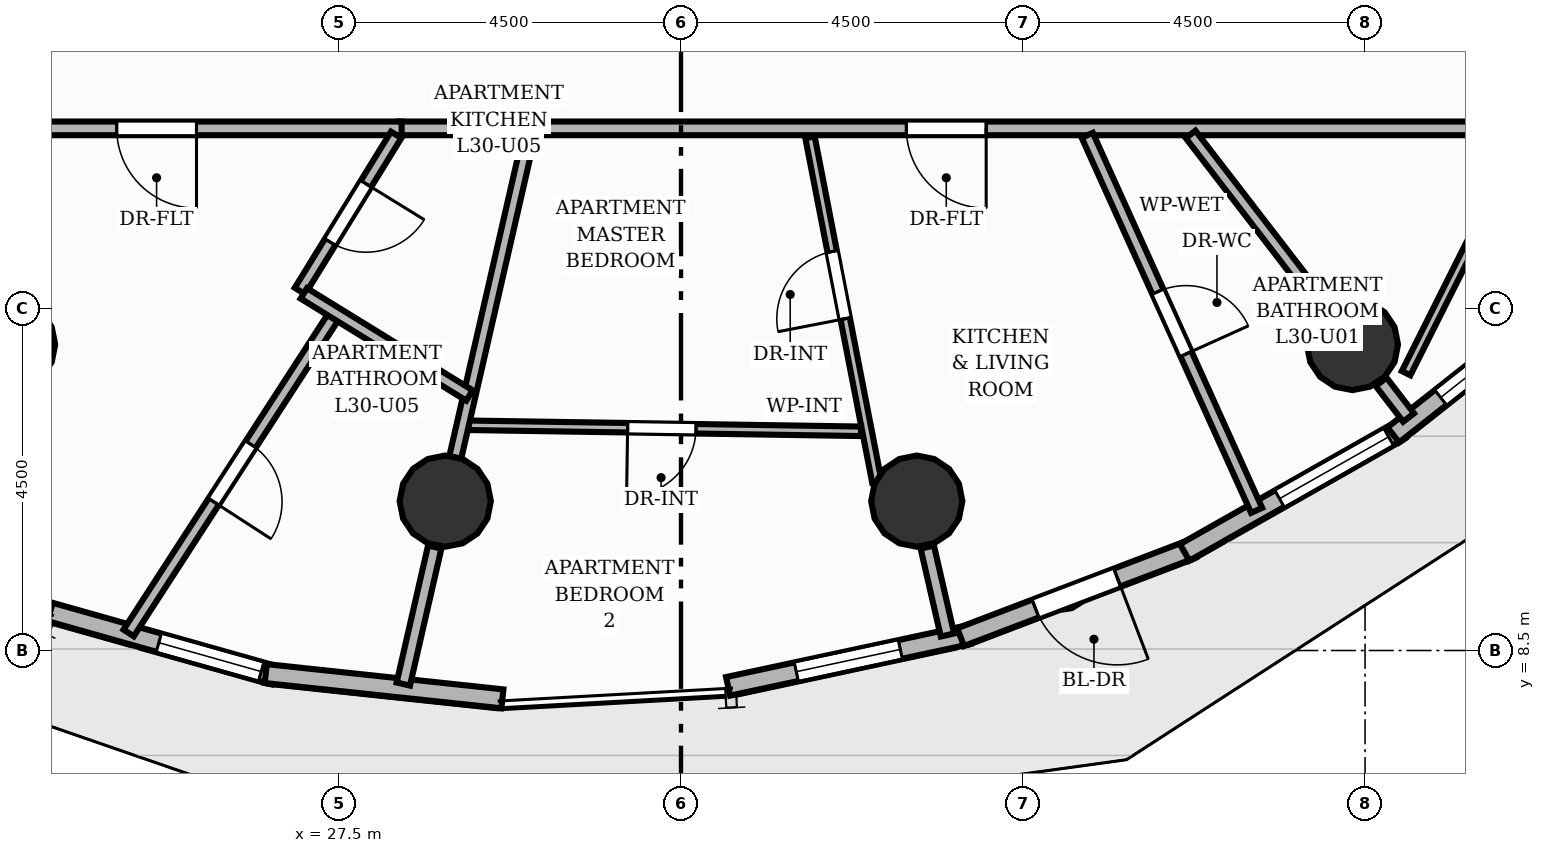
"""IFC4 building model, lengths in metres.
Left out: names, types, materials, properties, quantities, classifications, styles, units other than length and angle.
Written with IfcOpenShell. Run it as: python <this file> out.ifc"""

import sys

from ifc_helpers import new_model, si_unit, direction, frame, frame_2d, origin, origin_2d, place, context, subcontext, project, spatial, rectangle, circle, extrude, element, fill, save


model = new_model("IFC4")
c1 = context("Model", 3, precision=1e-05, world=origin(), true_north=direction((0.0, 1.0)))
c2 = subcontext(c1, "Body", "Model", "MODEL_VIEW")
j1 = project(units=[si_unit("LENGTHUNIT", "METRE"), si_unit("PLANEANGLEUNIT", "RADIAN")], contexts=[c1])
p1 = place(None, origin())
s1 = spatial("IfcSite", under=j1, at=p1, CompositionType="ELEMENT")
p2 = place(p1, origin())
s2 = spatial("IfcBuilding", under=s1, at=p2, CompositionType="ELEMENT")
p3 = place(p2, frame((0.0, 0.0, 102.88)))
s3 = spatial("IfcBuildingStorey", under=s2, at=p3, CompositionType="ELEMENT", Elevation=102.88)
for number, where, z_axis, x_axis in (
    (1, (23.167, 12.526, 0.0), (0.0, 0.0, 1.0), (1.0, 0.0, 0.0)),
    (2, (28.898, 10.465, 0.0), (0.0, 0.0, 1.0), (1.0, 0.0, 0.0)),
    (3, (35.102, 10.465, 0.0), (0.0, 0.0, 1.0), (1.0, 0.0, 0.0)),
    (4, (40.833, 12.526, 0.0), (0.0, 0.0, 1.0), (1.0, 0.0, 0.0)),
):
    element("IfcColumn", number, at=place(p3, frame(where, z_axis=z_axis, x_axis=x_axis)), inside=s3, PredefinedType="COLUMN", context=c2, shape_type="SweptSolid", body=[
        extrude(circle(Radius=0.6, at=origin_2d()), origin(), (0.0, 0.0, 1.0), 3.2),
    ])
p4 = place(p3, frame((26.646, 8.175, 0.0), z_axis=(0.0, 0.0, 1.0), x_axis=(-0.962391946781, 0.271664758059, 0.0)))
e5 = element("IfcWall", 5, at=p4, inside=s3, PredefinedType="SOLIDWALL", context=c2, shape_type="SweptSolid", body=[
    extrude(rectangle(XDim=3.061, YDim=0.25, at=frame_2d((1.531, 0.0))), origin(), (0.0, 0.0, 1.0), 2.96),
])
p5 = place(p4, frame((0.175, 0.0, 0.85)))
e6 = element("IfcOpeningElement", 6, at=p5, cuts=e5, PredefinedType="OPENING", context=c2, shape_type="SweptSolid", body=[
    extrude(rectangle(XDim=1.4, YDim=1.55, at=frame_2d((0.7, 0.775))), frame((0.0, 0.135, 0.0), z_axis=(0.0, -1.0, 0.0), x_axis=(1.0, 0.0, 0.0)), (0.0, 0.0, 1.0), 0.27),
])
p6 = place(p3, frame((29.65, 7.864, 0.0), z_axis=(0.0, 0.0, 1.0), x_axis=(-0.994353607356, 0.106117404502, 0.0)))
e7 = element("IfcWall", 7, at=p6, inside=s3, PredefinedType="SOLIDWALL", context=c2, shape_type="SweptSolid", body=[
    extrude(rectangle(XDim=3.131, YDim=0.25, at=frame_2d((1.565, 0.0))), origin(), (0.0, 0.0, 1.0), 2.96),
])
p7 = place(p3, frame((35.783, 8.707, 0.0), z_axis=(0.0, 0.0, 1.0), x_axis=(-0.977758229837, -0.209735175845, 0.0)))
e8 = element("IfcWall", 8, at=p7, inside=s3, PredefinedType="SOLIDWALL", context=c2, shape_type="SweptSolid", body=[
    extrude(rectangle(XDim=3.236, YDim=0.25, at=frame_2d((1.618, 0.0))), origin(), (0.0, 0.0, 1.0), 2.96),
])
p8 = place(p7, frame((0.918, 0.0, 0.85)))
e9 = element("IfcOpeningElement", 9, at=p8, cuts=e8, PredefinedType="OPENING", context=c2, shape_type="SweptSolid", body=[
    extrude(rectangle(XDim=1.4, YDim=1.55, at=frame_2d((0.7, 0.775))), frame((0.0, 0.135, 0.0), z_axis=(0.0, -1.0, 0.0), x_axis=(1.0, 0.0, 0.0)), (0.0, 0.0, 1.0), 0.27),
])
p9 = place(p3, frame((38.725, 9.836, 0.0), z_axis=(0.0, 0.0, 1.0), x_axis=(-0.934481801939, -0.3560109013, 0.0)))
e10 = element("IfcWall", 10, at=p9, inside=s3, PredefinedType="SOLIDWALL", context=c2, shape_type="SweptSolid", body=[
    extrude(rectangle(XDim=3.26, YDim=0.25, at=frame_2d((1.63, 0.0))), origin(), (0.0, 0.0, 1.0), 2.96),
])
p10 = place(p9, frame((1.055, 0.0, 0.0)))
e11 = element("IfcOpeningElement", 11, at=p10, cuts=e10, PredefinedType="OPENING", context=c2, shape_type="SweptSolid", body=[
    extrude(rectangle(XDim=1.15, YDim=2.2, at=frame_2d((0.575, 1.1))), frame((0.0, 0.135, 0.0), z_axis=(0.0, -1.0, 0.0), x_axis=(1.0, 0.0, 0.0)), (0.0, 0.0, 1.0), 0.27),
])
p11 = place(p3, frame((41.462, 11.397, 0.0), z_axis=(0.0, 0.0, 1.0), x_axis=(-0.869984700924, -0.493078715986, 0.0)))
e12 = element("IfcWall", 12, at=p11, inside=s3, PredefinedType="SOLIDWALL", context=c2, shape_type="SweptSolid", body=[
    extrude(rectangle(XDim=3.26, YDim=0.25, at=frame_2d((1.63, 0.0))), origin(), (0.0, 0.0, 1.0), 2.96),
])
p12 = place(p11, frame((0.175, 0.0, 0.85)))
e13 = element("IfcOpeningElement", 13, at=p12, cuts=e12, PredefinedType="OPENING", context=c2, shape_type="SweptSolid", body=[
    extrude(rectangle(XDim=1.65, YDim=1.55, at=frame_2d((0.825, 0.775))), frame((0.0, 0.135, 0.0), z_axis=(0.0, -1.0, 0.0), x_axis=(1.0, 0.0, 0.0)), (0.0, 0.0, 1.0), 0.27),
])
p13 = place(p3, frame((43.912, 13.342, 0.0), z_axis=(0.0, 0.0, 1.0), x_axis=(-0.784871179145, -0.619658964389, 0.0)))
e14 = element("IfcWall", 14, at=p13, inside=s3, PredefinedType="SOLIDWALL", context=c2, shape_type="SweptSolid", body=[
    extrude(rectangle(XDim=3.236, YDim=0.25, at=frame_2d((1.618, 0.0))), origin(), (0.0, 0.0, 1.0), 2.96),
])
p14 = place(p13, frame((0.793, 0.0, 0.85)))
e15 = element("IfcOpeningElement", 15, at=p14, cuts=e14, PredefinedType="OPENING", context=c2, shape_type="SweptSolid", body=[
    extrude(rectangle(XDim=1.65, YDim=1.55, at=frame_2d((0.825, 0.775))), frame((0.0, 0.135, 0.0), z_axis=(0.0, -1.0, 0.0), x_axis=(1.0, 0.0, 0.0)), (0.0, 0.0, 1.0), 0.27),
])
p15 = place(p3, frame((28.76, 9.861, 0.0), z_axis=(0.0, 0.0, 1.0), x_axis=(-0.2234127464, -0.974723932581, 0.0)))
e16 = element("IfcWall", 16, at=p15, inside=s3, PredefinedType="PARTITIONING", context=c2, shape_type="SweptSolid", body=[
    extrude(rectangle(XDim=1.849, YDim=0.18, at=frame_2d((0.924, 0.0))), origin(), (0.0, 0.0, 1.0), 2.261),
])
p16 = place(p3, frame((35.24, 9.861, 0.0), z_axis=(0.0, 0.0, 1.0), x_axis=(0.223327310752, -0.974743511018, 0.0)))
e17 = element("IfcWall", 17, at=p16, inside=s3, PredefinedType="PARTITIONING", context=c2, shape_type="SweptSolid", body=[
    extrude(rectangle(XDim=1.187, YDim=0.18, at=frame_2d((0.594, 0.0))), origin(), (0.0, 0.0, 1.0), 2.261),
])
p17 = place(p3, frame((41.212, 12.034, 0.0), z_axis=(0.0, 0.0, 1.0), x_axis=(0.609790512648, -0.792562635181, 0.0)))
e18 = element("IfcWall", 18, at=p17, inside=s3, PredefinedType="PARTITIONING", context=c2, shape_type="SweptSolid", body=[
    extrude(rectangle(XDim=0.592, YDim=0.18, at=frame_2d((0.296, 0.0))), origin(), (0.0, 0.0, 1.0), 2.261),
])
p18 = place(p3, frame((42.63, 15.37, 0.0), z_axis=(0.0, 0.0, 1.0), x_axis=(-1.0, 0.0, 0.0)))
e19 = element("IfcWall", 19, at=p18, inside=s3, PredefinedType="PARTITIONING", context=c2, shape_type="SweptSolid", body=[
    extrude(rectangle(XDim=14.346, YDim=0.18, at=frame_2d((7.173, 0.0))), origin(), (0.0, 0.0, 1.0), 2.955),
])
p19 = place(p18, frame((6.615, 0.0, 0.0)))
e20 = element("IfcOpeningElement", 20, at=p19, cuts=e19, PredefinedType="OPENING", context=c2, shape_type="SweptSolid", body=[
    extrude(rectangle(XDim=1.05, YDim=2.15, at=frame_2d((0.525, 1.075))), frame((0.0, 0.1, 0.0), z_axis=(0.0, -1.0, 0.0), x_axis=(1.0, 0.0, 0.0)), (0.0, 0.0, 1.0), 0.2),
])
p20 = place(p3, frame((28.325, 15.37, 0.0), z_axis=(0.0, 0.0, 1.0), x_axis=(-1.0, 0.0, 0.0)))
e21 = element("IfcWall", 21, at=p20, inside=s3, PredefinedType="PARTITIONING", context=c2, shape_type="SweptSolid", body=[
    extrude(rectangle(XDim=6.955, YDim=0.18, at=frame_2d((3.478, 0.0))), origin(), (0.0, 0.0, 1.0), 2.955),
])
p21 = place(p20, frame((2.7, 0.0, 0.0)))
e22 = element("IfcOpeningElement", 22, at=p21, cuts=e21, PredefinedType="OPENING", context=c2, shape_type="SweptSolid", body=[
    extrude(rectangle(XDim=1.05, YDim=2.15, at=frame_2d((0.525, 1.075))), frame((0.0, 0.1, 0.0), z_axis=(0.0, -1.0, 0.0), x_axis=(1.0, 0.0, 0.0)), (0.0, 0.0, 1.0), 0.2),
])
p22 = place(p3, frame((37.345, 15.279, 0.0), z_axis=(0.0, 0.0, 1.0), x_axis=(0.411532357021, -0.911395149825, 0.0)))
e23 = element("IfcWall", 23, at=p22, inside=s3, PredefinedType="PLUMBINGWALL", context=c2, shape_type="SweptSolid", body=[
    extrude(rectangle(XDim=5.415, YDim=0.16, at=frame_2d((2.707, 0.0))), origin(), (0.0, 0.0, 1.0), 2.642),
])
p23 = place(p22, frame((2.257, 0.0, 0.0)))
e24 = element("IfcOpeningElement", 24, at=p23, cuts=e23, PredefinedType="OPENING", context=c2, shape_type="SweptSolid", body=[
    extrude(rectangle(XDim=0.9, YDim=2.1, at=frame_2d((0.45, 1.05))), frame((0.0, 0.09, 0.0), z_axis=(0.0, -1.0, 0.0), x_axis=(1.0, 0.0, 0.0)), (0.0, 0.0, 1.0), 0.18),
])
p24 = place(p3, frame((34.577, 10.719, 0.0), z_axis=(0.0, 0.0, 1.0), x_axis=(-0.19043944415, 0.981698944744, 0.0)))
e25 = element("IfcWall", 25, at=p24, inside=s3, PredefinedType="PARTITIONING", context=c2, shape_type="SweptSolid", body=[
    extrude(rectangle(XDim=4.618, YDim=0.125, at=frame_2d((2.309, 0.0))), origin(), (0.0, 0.0, 1.0), 2.955),
])
p25 = place(p24, frame((2.187, 0.0, 0.0)))
e26 = element("IfcOpeningElement", 26, at=p25, cuts=e25, PredefinedType="OPENING", context=c2, shape_type="SweptSolid", body=[
    extrude(rectangle(XDim=0.9, YDim=2.1, at=frame_2d((0.45, 1.05))), frame((0.0, 0.073, 0.0), z_axis=(0.0, -1.0, 0.0), x_axis=(1.0, 0.0, 0.0)), (0.0, 0.0, 1.0), 0.145),
])
p26 = place(p3, frame((38.705, 15.291, 0.0), z_axis=(0.0, 0.0, 1.0), x_axis=(0.610033601295, -0.792375545617, 0.0)))
e27 = element("IfcWall", 27, at=p26, inside=s3, PredefinedType="PLUMBINGWALL", context=c2, shape_type="SweptSolid", body=[
    extrude(rectangle(XDim=2.887, YDim=0.16, at=frame_2d((1.443, 0.0))), origin(), (0.0, 0.0, 1.0), 2.261),
])
p27 = place(p3, frame((34.368, 11.384, 0.0), z_axis=(0.0, 0.0, 1.0), x_axis=(-0.999882579861, 0.015324049414, 0.0)))
e28 = element("IfcWall", 28, at=p27, inside=s3, PredefinedType="PARTITIONING", context=c2, shape_type="SweptSolid", body=[
    extrude(rectangle(XDim=5.242, YDim=0.125, at=frame_2d((2.621, 0.0))), origin(), (0.0, 0.0, 1.0), 2.955),
])
p28 = place(p27, frame((2.171, 0.0, 0.0)))
e29 = element("IfcOpeningElement", 29, at=p28, cuts=e28, PredefinedType="OPENING", context=c2, shape_type="SweptSolid", body=[
    extrude(rectangle(XDim=0.9, YDim=2.1, at=frame_2d((0.45, 1.05))), frame((0.0, 0.073, 0.0), z_axis=(0.0, -1.0, 0.0), x_axis=(1.0, 0.0, 0.0)), (0.0, 0.0, 1.0), 0.145),
])
p29 = place(p3, frame((29.03, 11.041, 0.0), z_axis=(0.0, 0.0, 1.0), x_axis=(0.223478419757, 0.974708877513, 0.0)))
e30 = element("IfcWall", 30, at=p29, inside=s3, PredefinedType="PLUMBINGWALL", context=c2, shape_type="SweptSolid", body=[
    extrude(rectangle(XDim=4.442, YDim=0.16, at=frame_2d((2.221, 0.0))), origin(), (0.0, 0.0, 1.0), 2.261),
])
p30 = place(p3, frame((46.746, 22.528, 0.0), z_axis=(0.0, 0.0, 1.0), x_axis=(-0.448357094434, -0.893854527242, 0.0)))
e31 = element("IfcWall", 31, at=p30, inside=s3, PredefinedType="PARTITIONING", context=c2, shape_type="SweptSolid", body=[
    extrude(rectangle(XDim=11.611, YDim=0.125, at=frame_2d((5.805, 0.0))), origin(), (0.0, 0.0, 1.0), 2.404),
])
p31 = place(p30, frame((4.375, 0.0, 0.0)))
e32 = element("IfcOpeningElement", 32, at=p31, cuts=e31, PredefinedType="OPENING", context=c2, shape_type="SweptSolid", body=[
    extrude(rectangle(XDim=0.9, YDim=2.1, at=frame_2d((0.45, 1.05))), frame((0.0, 0.073, 0.0), z_axis=(0.0, -1.0, 0.0), x_axis=(1.0, 0.0, 0.0)), (0.0, 0.0, 1.0), 0.145),
])
p32 = place(p3, frame((27.458, 12.94, 0.0), z_axis=(0.0, 0.0, 1.0), x_axis=(-0.543424886613, -0.839457796801, 0.0)))
e33 = element("IfcWall", 33, at=p32, inside=s3, PredefinedType="PLUMBINGWALL", context=c2, shape_type="SweptSolid", body=[
    extrude(rectangle(XDim=5.014, YDim=0.16, at=frame_2d((2.507, 0.0))), origin(), (0.0, 0.0, 1.0), 2.642),
])
p33 = place(p32, frame((2.057, 0.0, 0.0)))
e34 = element("IfcOpeningElement", 34, at=p33, cuts=e33, PredefinedType="OPENING", context=c2, shape_type="SweptSolid", body=[
    extrude(rectangle(XDim=0.9, YDim=2.1, at=frame_2d((0.45, 1.05))), frame((0.0, 0.09, 0.0), z_axis=(0.0, -1.0, 0.0), x_axis=(1.0, 0.0, 0.0)), (0.0, 0.0, 1.0), 0.18),
])
p34 = place(p3, frame((28.253, 15.285, 0.0), z_axis=(0.0, 0.0, 1.0), x_axis=(-0.524605293124, -0.851345574033, 0.0)))
e35 = element("IfcWall", 35, at=p34, inside=s3, PredefinedType="PLUMBINGWALL", context=c2, shape_type="SweptSolid", body=[
    extrude(rectangle(XDim=2.414, YDim=0.16, at=frame_2d((1.207, 0.0))), origin(), (0.0, 0.0, 1.0), 2.955),
])
p35 = place(p34, frame((0.757, 0.0, 0.0)))
e36 = element("IfcOpeningElement", 36, at=p35, cuts=e35, PredefinedType="OPENING", context=c2, shape_type="SweptSolid", body=[
    extrude(rectangle(XDim=0.9, YDim=2.1, at=frame_2d((0.45, 1.05))), frame((0.0, 0.09, 0.0), z_axis=(0.0, -1.0, 0.0), x_axis=(1.0, 0.0, 0.0)), (0.0, 0.0, 1.0), 0.18),
])
p36 = place(p3, frame((27.038, 13.199, 0.0), z_axis=(0.0, 0.0, 1.0), x_axis=(0.851314293413, -0.524656052887, 0.0)))
e37 = element("IfcWall", 37, at=p36, inside=s3, PredefinedType="PLUMBINGWALL", context=c2, shape_type="SweptSolid", body=[
    extrude(rectangle(XDim=2.56, YDim=0.16, at=frame_2d((1.28, 0.0))), origin(), (0.0, 0.0, 1.0), 2.955),
])
p37 = place(p10, origin())
e38 = element("IfcDoor", 38, at=p37, inside=s3, OperationType="SINGLE_SWING_LEFT", PredefinedType="DOOR", context=c2, shape_type="SweptSolid", body=[
    extrude(rectangle(XDim=1.15, YDim=2.2, at=frame_2d((0.575, 1.1))), frame((0.0, 0.025, 0.0), z_axis=(0.0, -1.0, 0.0), x_axis=(1.0, 0.0, 0.0)), (0.0, 0.0, 1.0), 0.05),
])
fill(e11, e38)
p38 = place(p5, origin())
e39 = element("IfcWindow", 39, at=p38, inside=s3, PartitioningType="SINGLE_PANEL", PredefinedType="WINDOW", context=c2, shape_type="SweptSolid", body=[
    extrude(rectangle(XDim=1.4, YDim=1.55, at=frame_2d((0.7, 0.775))), frame((0.0, 0.03, 0.0), z_axis=(0.0, -1.0, 0.0), x_axis=(1.0, 0.0, 0.0)), (0.0, 0.0, 1.0), 0.06),
])
fill(e6, e39)
p39 = place(p8, origin())
e40 = element("IfcWindow", 40, at=p39, inside=s3, PartitioningType="SINGLE_PANEL", PredefinedType="WINDOW", context=c2, shape_type="SweptSolid", body=[
    extrude(rectangle(XDim=1.4, YDim=1.55, at=frame_2d((0.7, 0.775))), frame((0.0, 0.03, 0.0), z_axis=(0.0, -1.0, 0.0), x_axis=(1.0, 0.0, 0.0)), (0.0, 0.0, 1.0), 0.06),
])
fill(e9, e40)
p40 = place(p12, origin())
e41 = element("IfcWindow", 41, at=p40, inside=s3, PartitioningType="SINGLE_PANEL", PredefinedType="WINDOW", context=c2, shape_type="SweptSolid", body=[
    extrude(rectangle(XDim=1.65, YDim=1.55, at=frame_2d((0.825, 0.775))), frame((0.0, 0.03, 0.0), z_axis=(0.0, -1.0, 0.0), x_axis=(1.0, 0.0, 0.0)), (0.0, 0.0, 1.0), 0.06),
])
fill(e13, e41)
p41 = place(p14, origin())
e42 = element("IfcWindow", 42, at=p41, inside=s3, PartitioningType="SINGLE_PANEL", PredefinedType="WINDOW", context=c2, shape_type="SweptSolid", body=[
    extrude(rectangle(XDim=1.65, YDim=1.55, at=frame_2d((0.825, 0.775))), frame((0.0, 0.03, 0.0), z_axis=(0.0, -1.0, 0.0), x_axis=(1.0, 0.0, 0.0)), (0.0, 0.0, 1.0), 0.06),
])
fill(e15, e42)
p42 = place(p19, origin())
e43 = element("IfcDoor", 43, at=p42, inside=s3, OperationType="SINGLE_SWING_LEFT", PredefinedType="DOOR", context=c2, shape_type="SweptSolid", body=[
    extrude(rectangle(XDim=1.05, YDim=2.15, at=frame_2d((0.525, 1.075))), frame((0.0, 0.025, 0.0), z_axis=(0.0, -1.0, 0.0), x_axis=(1.0, 0.0, 0.0)), (0.0, 0.0, 1.0), 0.05),
])
fill(e20, e43)
p43 = place(p23, origin())
e44 = element("IfcDoor", 44, at=p43, inside=s3, OperationType="SINGLE_SWING_RIGHT", PredefinedType="DOOR", context=c2, shape_type="SweptSolid", body=[
    extrude(rectangle(XDim=0.9, YDim=2.1, at=frame_2d((0.45, 1.05))), frame((0.0, 0.025, 0.0), z_axis=(0.0, -1.0, 0.0), x_axis=(1.0, 0.0, 0.0)), (0.0, 0.0, 1.0), 0.05),
])
fill(e24, e44)
p44 = place(p25, origin())
e45 = element("IfcDoor", 45, at=p44, inside=s3, OperationType="SINGLE_SWING_LEFT", PredefinedType="DOOR", context=c2, shape_type="SweptSolid", body=[
    extrude(rectangle(XDim=0.9, YDim=2.1, at=frame_2d((0.45, 1.05))), frame((0.0, 0.025, 0.0), z_axis=(0.0, -1.0, 0.0), x_axis=(1.0, 0.0, 0.0)), (0.0, 0.0, 1.0), 0.05),
])
fill(e26, e45)
p45 = place(p28, origin())
e46 = element("IfcDoor", 46, at=p45, inside=s3, OperationType="SINGLE_SWING_RIGHT", PredefinedType="DOOR", context=c2, shape_type="SweptSolid", body=[
    extrude(rectangle(XDim=0.9, YDim=2.1, at=frame_2d((0.45, 1.05))), frame((0.0, 0.025, 0.0), z_axis=(0.0, -1.0, 0.0), x_axis=(1.0, 0.0, 0.0)), (0.0, 0.0, 1.0), 0.05),
])
fill(e29, e46)
p46 = place(p21, origin())
e47 = element("IfcDoor", 47, at=p46, inside=s3, OperationType="SINGLE_SWING_LEFT", PredefinedType="DOOR", context=c2, shape_type="SweptSolid", body=[
    extrude(rectangle(XDim=1.05, YDim=2.15, at=frame_2d((0.525, 1.075))), frame((0.0, 0.025, 0.0), z_axis=(0.0, -1.0, 0.0), x_axis=(1.0, 0.0, 0.0)), (0.0, 0.0, 1.0), 0.05),
])
fill(e22, e47)
p47 = place(p33, origin())
e48 = element("IfcDoor", 48, at=p47, inside=s3, OperationType="SINGLE_SWING_RIGHT", PredefinedType="DOOR", context=c2, shape_type="SweptSolid", body=[
    extrude(rectangle(XDim=0.9, YDim=2.1, at=frame_2d((0.45, 1.05))), frame((0.0, 0.025, 0.0), z_axis=(0.0, -1.0, 0.0), x_axis=(1.0, 0.0, 0.0)), (0.0, 0.0, 1.0), 0.05),
])
fill(e34, e48)
p48 = place(p35, origin())
e49 = element("IfcDoor", 49, at=p48, inside=s3, OperationType="SINGLE_SWING_LEFT", PredefinedType="DOOR", context=c2, shape_type="SweptSolid", body=[
    extrude(rectangle(XDim=0.9, YDim=2.1, at=frame_2d((0.45, 1.05))), frame((0.0, 0.025, 0.0), z_axis=(0.0, -1.0, 0.0), x_axis=(1.0, 0.0, 0.0)), (0.0, 0.0, 1.0), 0.05),
])
fill(e36, e49)
save(model, sys.argv[1])
